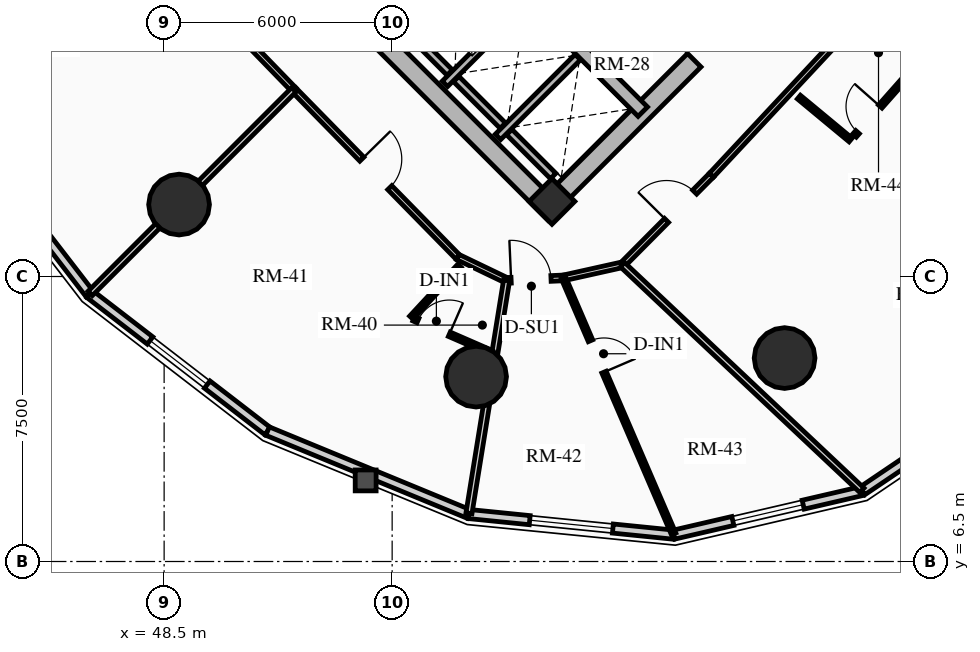
"""IFC4 building model, lengths in metres.
Left out: names, types, materials, properties, quantities, classifications, styles, units other than length and angle.
Written with IfcOpenShell. Run it as: python <this file> out.ifc"""

import sys

from ifc_helpers import new_model, si_unit, direction, frame, frame_2d, origin, origin_2d, place, context, subcontext, project, spatial, rectangle, circle, extrude, source, transform, mapped, element, fill, save


model = new_model("IFC4")
c1 = context("Model", 3, precision=1e-05, world=origin(), true_north=direction((0.0, 1.0)))
c2 = subcontext(c1, "Body", "Model", "MODEL_VIEW")
j1 = project(units=[si_unit("LENGTHUNIT", "METRE"), si_unit("PLANEANGLEUNIT", "RADIAN")], contexts=[c1])
p1 = place(None, origin())
s1 = spatial("IfcSite", under=j1, at=p1, CompositionType="ELEMENT")
p2 = place(p1, origin())
s2 = spatial("IfcBuilding", under=s1, at=p2, CompositionType="ELEMENT")
p3 = place(p2, frame((0.0, 0.0, 33.64)))
s3 = spatial("IfcBuildingStorey", under=s2, at=p3, CompositionType="ELEMENT", Elevation=33.64)
p4 = place(p3, frame((58.773, 15.661, 0.0), z_axis=(0.0, 0.0, 1.0), x_axis=(-0.707106781187, 0.707106781187, 0.0)))
e1 = element("IfcWall", 1, at=p4, inside=s3, PredefinedType="SHEAR", context=c2, shape_type="SweptSolid", body=[
    extrude(rectangle(XDim=14.3, YDim=0.5, at=frame_2d((7.15, 0.0))), origin(), (0.0, 0.0, 1.0), 2.91),
])
p5 = place(p3, frame((58.596, 15.838, 0.0), z_axis=(0.0, 0.0, 1.0), x_axis=(0.707106781187, 0.707106781187, 0.0)))
e2 = element("IfcWall", 2, at=p5, inside=s3, PredefinedType="SHEAR", context=c2, shape_type="SweptSolid", body=[
    extrude(rectangle(XDim=10.7, YDim=0.5, at=frame_2d((5.35, 0.0))), origin(), (0.0, 0.0, 1.0), 2.91),
])
m1 = source(origin(), c2, "Body", "SweptSolid", [
    extrude(rectangle(XDim=1.5, YDim=2.02, at=frame_2d((0.75, 1.01))), frame((0.0, 0.26, 0.0), z_axis=(0.0, -1.0, 0.0), x_axis=(1.0, 0.0, 0.0)), (0.0, 0.0, 1.0), 0.52),
])
p6 = place(p5, frame((5.45, 0.0, 0.0)))
e3 = element("IfcOpeningElement", 3, at=p6, cuts=e2, PredefinedType="OPENING", context=c2, shape_type="MappedRepresentation", body=[
    mapped(m1, transform((0.0, 0.0, 0.0), x_axis=(1.0, 0.0, 0.0), y_axis=(0.0, 1.0, 0.0), z_axis=(0.0, 0.0, 1.0), scale=1.0)),
])
p7 = place(p3, frame((61.096, 18.338, 0.0), z_axis=(0.0, 0.0, 1.0), x_axis=(-0.707106781187, 0.707106781187, 0.0)))
e4 = element("IfcWall", 4, at=p7, inside=s3, PredefinedType="SHEAR", context=c2, shape_type="SweptSolid", body=[
    extrude(rectangle(XDim=13.8, YDim=0.35, at=frame_2d((6.9, 0.0))), origin(), (0.0, 0.0, 1.0), 2.91),
])
m2 = source(origin(), c2, "Body", "SweptSolid", [
    extrude(rectangle(XDim=1.1, YDim=2.015, at=frame_2d((0.55, 1.007))), frame((0.0, 0.185, 0.0), z_axis=(0.0, -1.0, 0.0), x_axis=(1.0, 0.0, 0.0)), (0.0, 0.0, 1.0), 0.37),
])
p8 = place(p7, frame((4.9, 0.0, 0.0)))
e5 = element("IfcOpeningElement", 5, at=p8, cuts=e4, PredefinedType="OPENING", context=c2, shape_type="MappedRepresentation", body=[
    mapped(m2, transform((0.0, 0.0, 0.0), x_axis=(1.0, 0.0, 0.0), y_axis=(0.0, 1.0, 0.0), z_axis=(0.0, 0.0, 1.0), scale=1.0)),
])
m3 = source(origin(), c2, "Body", "SweptSolid", [
    extrude(rectangle(XDim=1.15, YDim=2.02, at=frame_2d((0.575, 1.01))), frame((0.0, 0.185, 0.0), z_axis=(0.0, -1.0, 0.0), x_axis=(1.0, 0.0, 0.0)), (0.0, 0.0, 1.0), 0.37),
])
p9 = place(p7, frame((7.32, 0.0, 0.0)))
e6 = element("IfcOpeningElement", 6, at=p9, cuts=e4, PredefinedType="OPENING", context=c2, shape_type="MappedRepresentation", body=[
    mapped(m3, transform((0.0, 0.0, 0.0), x_axis=(1.0, 0.0, 0.0), y_axis=(0.0, 1.0, 0.0), z_axis=(0.0, 0.0, 1.0), scale=1.0)),
])
p10 = place(p3, frame((58.706, 15.976, 0.0), z_axis=(0.0, 0.0, 1.0), x_axis=(0.707106781187, 0.707106781187, 0.0)))
e7 = element("IfcColumn", 7, at=p10, inside=s3, PredefinedType="COLUMN", context=c2, shape_type="SweptSolid", body=[
    extrude(rectangle(XDim=0.85, YDim=0.85, at=origin_2d()), origin(), (0.0, 0.0, 1.0), 2.91),
])
for number, where, z_axis, x_axis in (
    (8, (48.893, 15.893, 0.0), (0.0, 0.0, 1.0), (1.0, 0.0, 0.0)),
    (9, (56.709, 11.365, 0.0), (0.0, 0.0, 1.0), (1.0, 0.0, 0.0)),
    (10, (64.827, 11.854, 0.0), (0.0, 0.0, 1.0), (1.0, 0.0, 0.0)),
):
    element("IfcColumn", number, at=place(p3, frame(where, z_axis=z_axis, x_axis=x_axis)), inside=s3, PredefinedType="USERDEFINED", context=c2, shape_type="SweptSolid", body=[
        extrude(circle(Radius=0.8, at=origin_2d()), origin(), (0.0, 0.0, 1.0), 2.91),
    ])
p11 = place(p3, frame((46.541, 13.541, 0.0), z_axis=(0.0, 0.0, 1.0), x_axis=(-0.610494906082, 0.792020182601, 0.0)))
e11 = element("IfcWall", 11, at=p11, inside=s3, PredefinedType="SOLIDWALL", context=c2, shape_type="SweptSolid", body=[
    extrude(rectangle(XDim=5.911, YDim=0.24, at=frame_2d((2.956, 0.0))), origin(), (0.0, 0.0, 1.0), 2.073),
])
p12 = place(p3, frame((51.222, 9.932, 0.0), z_axis=(0.0, 0.0, 1.0), x_axis=(-0.792020182601, 0.610494906082, 0.0)))
e12 = element("IfcWall", 12, at=p12, inside=s3, PredefinedType="SOLIDWALL", context=c2, shape_type="SweptSolid", body=[
    extrude(rectangle(XDim=5.911, YDim=0.24, at=frame_2d((2.956, 0.0))), origin(), (0.0, 0.0, 1.0), 2.073),
])
m4 = source(origin(), c2, "Body", "SweptSolid", [
    extrude(rectangle(XDim=1.9, YDim=1.35, at=frame_2d((0.95, 0.675))), frame((0.0, 0.13, 0.0), z_axis=(0.0, -1.0, 0.0), x_axis=(1.0, 0.0, 0.0)), (0.0, 0.0, 1.0), 0.26),
])
p13 = place(p12, frame((2.005, 0.0, 0.65)))
e13 = element("IfcOpeningElement", 13, at=p13, cuts=e12, PredefinedType="OPENING", context=c2, shape_type="MappedRepresentation", body=[
    mapped(m4, transform((0.0, 0.0, 0.0), x_axis=(1.0, 0.0, 0.0), y_axis=(0.0, 1.0, 0.0), z_axis=(0.0, 0.0, 1.0), scale=1.0)),
])
p14 = place(p3, frame((56.518, 7.749, 0.0), z_axis=(0.0, 0.0, 1.0), x_axis=(-0.924542988536, 0.381077764176, 0.0)))
e14 = element("IfcWall", 14, at=p14, inside=s3, PredefinedType="SOLIDWALL", context=c2, shape_type="SweptSolid", body=[
    extrude(rectangle(XDim=5.728, YDim=0.24, at=frame_2d((2.864, 0.0))), origin(), (0.0, 0.0, 1.0), 2.073),
])
p15 = place(p3, frame((61.91, 7.206, 0.0), z_axis=(0.0, 0.0, 1.0), x_axis=(-0.994968263437, 0.100190592135, 0.0)))
e15 = element("IfcWall", 15, at=p15, inside=s3, PredefinedType="SOLIDWALL", context=c2, shape_type="SweptSolid", body=[
    extrude(rectangle(XDim=5.419, YDim=0.24, at=frame_2d((2.71, 0.0))), origin(), (0.0, 0.0, 1.0), 2.073),
])
m5 = source(origin(), c2, "Body", "SweptSolid", [
    extrude(rectangle(XDim=2.2, YDim=1.35, at=frame_2d((1.1, 0.675))), frame((0.0, 0.13, 0.0), z_axis=(0.0, -1.0, 0.0), x_axis=(1.0, 0.0, 0.0)), (0.0, 0.0, 1.0), 0.26),
])
p16 = place(p15, frame((1.61, 0.0, 0.65)))
e16 = element("IfcOpeningElement", 16, at=p16, cuts=e15, PredefinedType="OPENING", context=c2, shape_type="MappedRepresentation", body=[
    mapped(m5, transform((0.0, 0.0, 0.0), x_axis=(1.0, 0.0, 0.0), y_axis=(0.0, 1.0, 0.0), z_axis=(0.0, 0.0, 1.0), scale=1.0)),
])
p17 = place(p3, frame((66.871, 8.356, 0.0), z_axis=(0.0, 0.0, 1.0), x_axis=(-0.974167686491, -0.22582585901, 0.0)))
e17 = element("IfcWall", 17, at=p17, inside=s3, PredefinedType="SOLIDWALL", context=c2, shape_type="SweptSolid", body=[
    extrude(rectangle(XDim=5.092, YDim=0.24, at=frame_2d((2.546, 0.0))), origin(), (0.0, 0.0, 1.0), 2.073),
])
p18 = place(p17, frame((1.596, 0.0, 0.65)))
e18 = element("IfcOpeningElement", 18, at=p18, cuts=e17, PredefinedType="OPENING", context=c2, shape_type="MappedRepresentation", body=[
    mapped(m4, transform((0.0, 0.0, 0.0), x_axis=(1.0, 0.0, 0.0), y_axis=(0.0, 1.0, 0.0), z_axis=(0.0, 0.0, 1.0), scale=1.0)),
])
p19 = place(p3, frame((70.914, 11.086, 0.0), z_axis=(0.0, 0.0, 1.0), x_axis=(-0.828748297084, -0.559621532896, 0.0)))
e19 = element("IfcWall", 19, at=p19, inside=s3, PredefinedType="SOLIDWALL", context=c2, shape_type="SweptSolid", body=[
    extrude(rectangle(XDim=4.879, YDim=0.24, at=frame_2d((2.439, 0.0))), origin(), (0.0, 0.0, 1.0), 2.073),
])
p20 = place(p3, frame((55.888, 19.069, 0.0), z_axis=(0.0, 0.0, 1.0), x_axis=(0.707106781187, 0.707106781187, 0.0)))
e20 = element("IfcWall", 20, at=p20, inside=s3, PredefinedType="SHEAR", context=c2, shape_type="SweptSolid", body=[
    extrude(rectangle(XDim=2.97, YDim=0.2, at=frame_2d((1.485, 0.0))), origin(), (0.0, 0.0, 1.0), 2.91),
])
p21 = place(p3, frame((56.015, 19.366, 0.0), z_axis=(0.0, 0.0, 1.0), x_axis=(-0.707106781187, 0.707106781187, 0.0)))
e21 = element("IfcWall", 21, at=p21, inside=s3, PredefinedType="SHEAR", context=c2, shape_type="SweptSolid", body=[
    extrude(rectangle(XDim=2.44, YDim=0.2, at=frame_2d((1.22, 0.0))), origin(), (0.0, 0.0, 1.0), 2.91),
])
p22 = place(p3, frame((57.284, 17.673, 0.0), z_axis=(0.0, 0.0, 1.0), x_axis=(0.707147878904, 0.70706568108, 0.0)))
e22 = element("IfcWall", 22, at=p22, inside=s3, PredefinedType="SHEAR", context=c2, shape_type="SweptSolid", body=[
    extrude(rectangle(XDim=2.97, YDim=0.2, at=frame_2d((1.485, 0.0))), origin(), (0.0, 0.0, 1.0), 2.91),
])
p23 = place(p3, frame((57.412, 17.97, 0.0), z_axis=(0.0, 0.0, 1.0), x_axis=(-0.707106781187, 0.707106781187, 0.0)))
e23 = element("IfcWall", 23, at=p23, inside=s3, PredefinedType="SHEAR", context=c2, shape_type="SweptSolid", body=[
    extrude(rectangle(XDim=1.735, YDim=0.2, at=frame_2d((0.867, 0.0))), origin(), (0.0, 0.0, 1.0), 2.91),
])
p24 = place(p3, frame((58.737, 16.644, 0.0), z_axis=(0.0, 0.0, 1.0), x_axis=(-0.707032117043, 0.707181437447, 0.0)))
e24 = element("IfcWall", 24, at=p24, inside=s3, PredefinedType="SHEAR", context=c2, shape_type="SweptSolid", body=[
    extrude(rectangle(XDim=1.635, YDim=0.2, at=frame_2d((0.817, 0.0))), origin(), (0.0, 0.0, 1.0), 2.91),
])
p25 = place(p3, frame((47.706, 23.253, 0.0), z_axis=(0.0, 0.0, 1.0), x_axis=(0.696179266346, -0.717867974707, 0.0)))
e25 = element("IfcWall", 25, at=p25, inside=s3, PredefinedType="PARTITIONING", context=c2, shape_type="SweptSolid", body=[
    extrude(rectangle(XDim=6.045, YDim=0.15, at=frame_2d((3.022, 0.0))), origin(), (0.0, 0.0, 1.0), 2.635),
])
m6 = source(origin(), c2, "Body", "SweptSolid", [
    extrude(rectangle(XDim=1.05, YDim=2.015, at=frame_2d((0.525, 1.007))), frame((0.0, 0.085, 0.0), z_axis=(0.0, -1.0, 0.0), x_axis=(1.0, 0.0, 0.0)), (0.0, 0.0, 1.0), 0.17),
])
p26 = place(p25, frame((2.497, 0.0, 0.0)))
e26 = element("IfcOpeningElement", 26, at=p26, cuts=e25, PredefinedType="OPENING", context=c2, shape_type="MappedRepresentation", body=[
    mapped(m6, transform((0.0, 0.0, 0.0), x_axis=(1.0, 0.0, 0.0), y_axis=(0.0, 1.0, 0.0), z_axis=(0.0, 0.0, 1.0), scale=1.0)),
])
p27 = place(p3, frame((51.914, 18.914, 0.0), z_axis=(0.0, 0.0, 1.0), x_axis=(0.699999313799, -0.714143515465, 0.0)))
e27 = element("IfcWall", 27, at=p27, inside=s3, PredefinedType="PARTITIONING", context=c2, shape_type="SweptSolid", body=[
    extrude(rectangle(XDim=6.162, YDim=0.15, at=frame_2d((3.081, 0.0))), origin(), (0.0, 0.0, 1.0), 2.159),
])
p28 = place(p27, frame((2.556, 0.0, 0.0)))
e28 = element("IfcOpeningElement", 28, at=p28, cuts=e27, PredefinedType="OPENING", context=c2, shape_type="MappedRepresentation", body=[
    mapped(m6, transform((0.0, 0.0, 0.0), x_axis=(1.0, 0.0, 0.0), y_axis=(0.0, 1.0, 0.0), z_axis=(0.0, 0.0, 1.0), scale=1.0)),
])
p29 = place(p3, frame((56.227, 14.513, 0.0), z_axis=(0.0, 0.0, 1.0), x_axis=(0.901477579283, -0.432825801044, 0.0)))
e29 = element("IfcWall", 29, at=p29, inside=s3, PredefinedType="PARTITIONING", context=c2, shape_type="SweptSolid", body=[
    extrude(rectangle(XDim=1.424, YDim=0.15, at=frame_2d((0.712, 0.0))), origin(), (0.0, 0.0, 1.0), 2.205),
])
p30 = place(p3, frame((57.511, 13.897, 0.0), z_axis=(0.0, 0.0, 1.0), x_axis=(0.999024538494, 0.044158481476, 0.0)))
e30 = element("IfcWall", 30, at=p30, inside=s3, PredefinedType="PARTITIONING", context=c2, shape_type="SweptSolid", body=[
    extrude(rectangle(XDim=1.498, YDim=0.15, at=frame_2d((0.749, 0.0))), origin(), (0.0, 0.0, 1.0), 2.159),
])
p31 = place(p30, frame((0.12, 0.0, 0.0)))
e31 = element("IfcOpeningElement", 31, at=p31, cuts=e30, PredefinedType="OPENING", context=c2, shape_type="MappedRepresentation", body=[
    mapped(m6, transform((0.0, 0.0, 0.0), x_axis=(1.0, 0.0, 0.0), y_axis=(0.0, 1.0, 0.0), z_axis=(0.0, 0.0, 1.0), scale=1.0)),
])
p32 = place(p3, frame((59.008, 13.963, 0.0), z_axis=(0.0, 0.0, 1.0), x_axis=(0.976020856791, 0.21767702476, 0.0)))
e32 = element("IfcWall", 32, at=p32, inside=s3, PredefinedType="PARTITIONING", context=c2, shape_type="SweptSolid", body=[
    extrude(rectangle(XDim=1.593, YDim=0.15, at=frame_2d((0.796, 0.0))), origin(), (0.0, 0.0, 1.0), 2.205),
])
p33 = place(p3, frame((60.562, 14.31, 0.0), z_axis=(0.0, 0.0, 1.0), x_axis=(0.704566236161, 0.709638230975, 0.0)))
e33 = element("IfcWall", 33, at=p33, inside=s3, PredefinedType="PARTITIONING", context=c2, shape_type="SweptSolid", body=[
    extrude(rectangle(XDim=3.321, YDim=0.15, at=frame_2d((1.661, 0.0))), origin(), (0.0, 0.0, 1.0), 2.159),
])
p34 = place(p33, frame((1.643, 0.0, 0.0)))
e34 = element("IfcOpeningElement", 34, at=p34, cuts=e33, PredefinedType="OPENING", context=c2, shape_type="MappedRepresentation", body=[
    mapped(m6, transform((0.0, 0.0, 0.0), x_axis=(1.0, 0.0, 0.0), y_axis=(0.0, 1.0, 0.0), z_axis=(0.0, 0.0, 1.0), scale=1.0)),
])
p35 = place(p3, frame((62.903, 16.667, 0.0), z_axis=(0.0, 0.0, 1.0), x_axis=(0.682371947497, 0.731005147225, 0.0)))
e35 = element("IfcWall", 35, at=p35, inside=s3, PredefinedType="PARTITIONING", context=c2, shape_type="SweptSolid", body=[
    extrude(rectangle(XDim=6.642, YDim=0.15, at=frame_2d((3.321, 0.0))), origin(), (0.0, 0.0, 1.0), 2.159),
])
p36 = place(p3, frame((51.914, 18.914, 0.0), z_axis=(0.0, 0.0, 1.0), x_axis=(-0.707106781187, -0.707106781187, 0.0)))
e36 = element("IfcWall", 36, at=p36, inside=s3, PredefinedType="PARTITIONING", context=c2, shape_type="SweptSolid", body=[
    extrude(rectangle(XDim=7.579, YDim=0.16, at=frame_2d((3.79, 0.0))), origin(), (0.0, 0.0, 1.0), 2.073),
])
p37 = place(p3, frame((57.511, 13.897, 0.0), z_axis=(0.0, 0.0, 1.0), x_axis=(-0.159485929017, -0.987200201806, 0.0)))
e37 = element("IfcWall", 37, at=p37, inside=s3, PredefinedType="PARTITIONING", context=c2, shape_type="SweptSolid", body=[
    extrude(rectangle(XDim=6.207, YDim=0.16, at=frame_2d((3.104, 0.0))), origin(), (0.0, 0.0, 1.0), 2.073),
])
p38 = place(p3, frame((60.562, 14.31, 0.0), z_axis=(0.0, 0.0, 1.0), x_axis=(0.727781661561, -0.685808904211, 0.0)))
e38 = element("IfcWall", 38, at=p38, inside=s3, PredefinedType="PARTITIONING", context=c2, shape_type="SweptSolid", body=[
    extrude(rectangle(XDim=8.655, YDim=0.16, at=frame_2d((4.328, 0.0))), origin(), (0.0, 0.0, 1.0), 2.073),
])
p39 = place(p3, frame((67.435, 21.521, 0.0), z_axis=(0.0, 0.0, 1.0), x_axis=(0.6962628802, -0.717786877601, 0.0)))
e39 = element("IfcWall", 39, at=p39, inside=s3, PredefinedType="PARTITIONING", context=c2, shape_type="SweptSolid", body=[
    extrude(rectangle(XDim=8.893, YDim=0.16, at=frame_2d((4.446, 0.0))), origin(), (0.0, 0.0, 1.0), 2.073),
])
p40 = place(p3, frame((56.274, 14.283, 0.0), z_axis=(0.0, 0.0, 1.0), x_axis=(-0.679968993343, -0.733240866354, 0.0)))
e40 = element("IfcWall", 40, at=p40, inside=s3, PredefinedType="PARTITIONING", context=c2, shape_type="SweptSolid", body=[
    extrude(rectangle(XDim=1.865, YDim=0.125, at=frame_2d((0.933, 0.0))), origin(), (0.0, 0.0, 1.0), 2.205),
])
p41 = place(p3, frame((55.069, 12.888, 0.0), z_axis=(0.0, 0.0, 1.0), x_axis=(0.916790743628, -0.399367916085, 0.0)))
e41 = element("IfcWall", 41, at=p41, inside=s3, PredefinedType="PARTITIONING", context=c2, shape_type="SweptSolid", body=[
    extrude(rectangle(XDim=2.225, YDim=0.125, at=frame_2d((1.113, 0.0))), origin(), (0.0, 0.0, 1.0), 2.159),
])
m7 = source(origin(), c2, "Body", "SweptSolid", [
    extrude(rectangle(XDim=0.9, YDim=2.005, at=frame_2d((0.45, 1.002))), frame((0.0, 0.073, 0.0), z_axis=(0.0, -1.0, 0.0), x_axis=(1.0, 0.0, 0.0)), (0.0, 0.0, 1.0), 0.145),
])
p42 = place(p41, frame((0.12, 0.0, 0.0)))
e42 = element("IfcOpeningElement", 42, at=p42, cuts=e41, PredefinedType="OPENING", context=c2, shape_type="MappedRepresentation", body=[
    mapped(m7, transform((0.0, 0.0, 0.0), x_axis=(1.0, 0.0, 0.0), y_axis=(0.0, 1.0, 0.0), z_axis=(0.0, 0.0, 1.0), scale=1.0)),
])
p43 = place(p3, frame((59.008, 13.963, 0.0), z_axis=(0.0, 0.0, 1.0), x_axis=(0.395256697593, -0.918570706592, 0.0)))
e43 = element("IfcWall", 43, at=p43, inside=s3, PredefinedType="PARTITIONING", context=c2, shape_type="SweptSolid", body=[
    extrude(rectangle(XDim=7.334, YDim=0.125, at=frame_2d((3.667, 0.0))), origin(), (0.0, 0.0, 1.0), 2.073),
])
p44 = place(p43, frame((1.8, 0.0, 0.0)))
e44 = element("IfcOpeningElement", 44, at=p44, cuts=e43, PredefinedType="OPENING", context=c2, shape_type="MappedRepresentation", body=[
    mapped(m7, transform((0.0, 0.0, 0.0), x_axis=(1.0, 0.0, 0.0), y_axis=(0.0, 1.0, 0.0), z_axis=(0.0, 0.0, 1.0), scale=1.0)),
])
p45 = place(p3, frame((65.202, 18.721, 0.0), z_axis=(0.0, 0.0, 1.0), x_axis=(0.769814202386, -0.638268042287, 0.0)))
e45 = element("IfcWall", 45, at=p45, inside=s3, PredefinedType="PARTITIONING", context=c2, shape_type="SweptSolid", body=[
    extrude(rectangle(XDim=1.769, YDim=0.125, at=frame_2d((0.884, 0.0))), origin(), (0.0, 0.0, 1.0), 2.635),
])
p46 = place(p3, frame((66.667, 17.709, 0.0), z_axis=(0.0, 0.0, 1.0), x_axis=(0.662510581678, 0.749052554341, 0.0)))
e46 = element("IfcWall", 46, at=p46, inside=s3, PredefinedType="PARTITIONING", context=c2, shape_type="SweptSolid", body=[
    extrude(rectangle(XDim=2.996, YDim=0.125, at=frame_2d((1.498, 0.0))), origin(), (0.0, 0.0, 1.0), 2.159),
])
p47 = place(p46, frame((0.12, 0.0, 0.0)))
e47 = element("IfcOpeningElement", 47, at=p47, cuts=e46, PredefinedType="OPENING", context=c2, shape_type="MappedRepresentation", body=[
    mapped(m7, transform((0.0, 0.0, 0.0), x_axis=(1.0, 0.0, 0.0), y_axis=(0.0, 1.0, 0.0), z_axis=(0.0, 0.0, 1.0), scale=1.0)),
])
m8 = source(origin(), c2, "Body", "SweptSolid", [
    extrude(rectangle(XDim=1.9, YDim=1.35, at=frame_2d((0.95, 0.675))), frame((0.0, 0.03, 0.0), z_axis=(0.0, -1.0, 0.0), x_axis=(1.0, 0.0, 0.0)), (0.0, 0.0, 1.0), 0.06),
])
p48 = place(p13, origin())
e48 = element("IfcWindow", 48, at=p48, inside=s3, PartitioningType="DOUBLE_PANEL_VERTICAL", PredefinedType="WINDOW", context=c2, shape_type="MappedRepresentation", body=[
    mapped(m8, transform((0.0, 0.0, 0.0), x_axis=(1.0, 0.0, 0.0), y_axis=(0.0, 1.0, 0.0), z_axis=(0.0, 0.0, 1.0), scale=1.0)),
])
fill(e13, e48)
m9 = source(origin(), c2, "Body", "SweptSolid", [
    extrude(rectangle(XDim=2.2, YDim=1.35, at=frame_2d((1.1, 0.675))), frame((0.0, 0.03, 0.0), z_axis=(0.0, -1.0, 0.0), x_axis=(1.0, 0.0, 0.0)), (0.0, 0.0, 1.0), 0.06),
])
p49 = place(p16, origin())
e49 = element("IfcWindow", 49, at=p49, inside=s3, PartitioningType="DOUBLE_PANEL_VERTICAL", PredefinedType="WINDOW", context=c2, shape_type="MappedRepresentation", body=[
    mapped(m9, transform((0.0, 0.0, 0.0), x_axis=(1.0, 0.0, 0.0), y_axis=(0.0, 1.0, 0.0), z_axis=(0.0, 0.0, 1.0), scale=1.0)),
])
fill(e16, e49)
p50 = place(p18, origin())
e50 = element("IfcWindow", 50, at=p50, inside=s3, PartitioningType="DOUBLE_PANEL_VERTICAL", PredefinedType="WINDOW", context=c2, shape_type="MappedRepresentation", body=[
    mapped(m8, transform((0.0, 0.0, 0.0), x_axis=(1.0, 0.0, 0.0), y_axis=(0.0, 1.0, 0.0), z_axis=(0.0, 0.0, 1.0), scale=1.0)),
])
fill(e18, e50)
m10 = source(origin(), c2, "Body", "SweptSolid", [
    extrude(rectangle(XDim=1.5, YDim=2.02, at=frame_2d((0.75, 1.01))), frame((0.0, 0.025, 0.0), z_axis=(0.0, -1.0, 0.0), x_axis=(1.0, 0.0, 0.0)), (0.0, 0.0, 1.0), 0.05),
])
p51 = place(p6, origin())
e51 = element("IfcDoor", 51, at=p51, inside=s3, OperationType="DOUBLE_DOOR_SINGLE_SWING", PredefinedType="DOOR", context=c2, shape_type="MappedRepresentation", body=[
    mapped(m10, transform((0.0, 0.0, 0.0), x_axis=(1.0, 0.0, 0.0), y_axis=(0.0, 1.0, 0.0), z_axis=(0.0, 0.0, 1.0), scale=1.0)),
])
fill(e3, e51)
m11 = source(origin(), c2, "Body", "SweptSolid", [
    extrude(rectangle(XDim=1.05, YDim=2.015, at=frame_2d((0.525, 1.007))), frame((0.0, 0.025, 0.0), z_axis=(0.0, -1.0, 0.0), x_axis=(1.0, 0.0, 0.0)), (0.0, 0.0, 1.0), 0.05),
])
p52 = place(p28, origin())
e52 = element("IfcDoor", 52, at=p52, inside=s3, OperationType="SINGLE_SWING_LEFT", PredefinedType="DOOR", context=c2, shape_type="MappedRepresentation", body=[
    mapped(m11, transform((0.0, 0.0, 0.0), x_axis=(1.0, 0.0, 0.0), y_axis=(0.0, 1.0, 0.0), z_axis=(0.0, 0.0, 1.0), scale=1.0)),
])
fill(e28, e52)
m12 = source(origin(), c2, "Body", "SweptSolid", [
    extrude(rectangle(XDim=0.9, YDim=2.005, at=frame_2d((0.45, 1.002))), frame((0.0, 0.025, 0.0), z_axis=(0.0, -1.0, 0.0), x_axis=(1.0, 0.0, 0.0)), (0.0, 0.0, 1.0), 0.05),
])
p53 = place(p42, origin())
e53 = element("IfcDoor", 53, at=p53, inside=s3, OperationType="SINGLE_SWING_RIGHT", PredefinedType="DOOR", context=c2, shape_type="MappedRepresentation", body=[
    mapped(m12, transform((0.0, 0.0, 0.0), x_axis=(1.0, 0.0, 0.0), y_axis=(0.0, 1.0, 0.0), z_axis=(0.0, 0.0, 1.0), scale=1.0)),
])
fill(e42, e53)
p54 = place(p31, origin())
e54 = element("IfcDoor", 54, at=p54, inside=s3, OperationType="SINGLE_SWING_LEFT", PredefinedType="DOOR", context=c2, shape_type="MappedRepresentation", body=[
    mapped(m11, transform((0.0, 0.0, 0.0), x_axis=(1.0, 0.0, 0.0), y_axis=(0.0, 1.0, 0.0), z_axis=(0.0, 0.0, 1.0), scale=1.0)),
])
fill(e31, e54)
p55 = place(p44, origin())
e55 = element("IfcDoor", 55, at=p55, inside=s3, OperationType="SINGLE_SWING_RIGHT", PredefinedType="DOOR", context=c2, shape_type="MappedRepresentation", body=[
    mapped(m12, transform((0.0, 0.0, 0.0), x_axis=(1.0, 0.0, 0.0), y_axis=(0.0, 1.0, 0.0), z_axis=(0.0, 0.0, 1.0), scale=1.0)),
])
fill(e44, e55)
p56 = place(p34, origin())
e56 = element("IfcDoor", 56, at=p56, inside=s3, OperationType="SINGLE_SWING_LEFT", PredefinedType="DOOR", context=c2, shape_type="MappedRepresentation", body=[
    mapped(m11, transform((0.0, 0.0, 0.0), x_axis=(1.0, 0.0, 0.0), y_axis=(0.0, 1.0, 0.0), z_axis=(0.0, 0.0, 1.0), scale=1.0)),
])
fill(e34, e56)
p57 = place(p47, origin())
e57 = element("IfcDoor", 57, at=p57, inside=s3, OperationType="SINGLE_SWING_RIGHT", PredefinedType="DOOR", context=c2, shape_type="MappedRepresentation", body=[
    mapped(m12, transform((0.0, 0.0, 0.0), x_axis=(1.0, 0.0, 0.0), y_axis=(0.0, 1.0, 0.0), z_axis=(0.0, 0.0, 1.0), scale=1.0)),
])
fill(e47, e57)
save(model, sys.argv[1])
